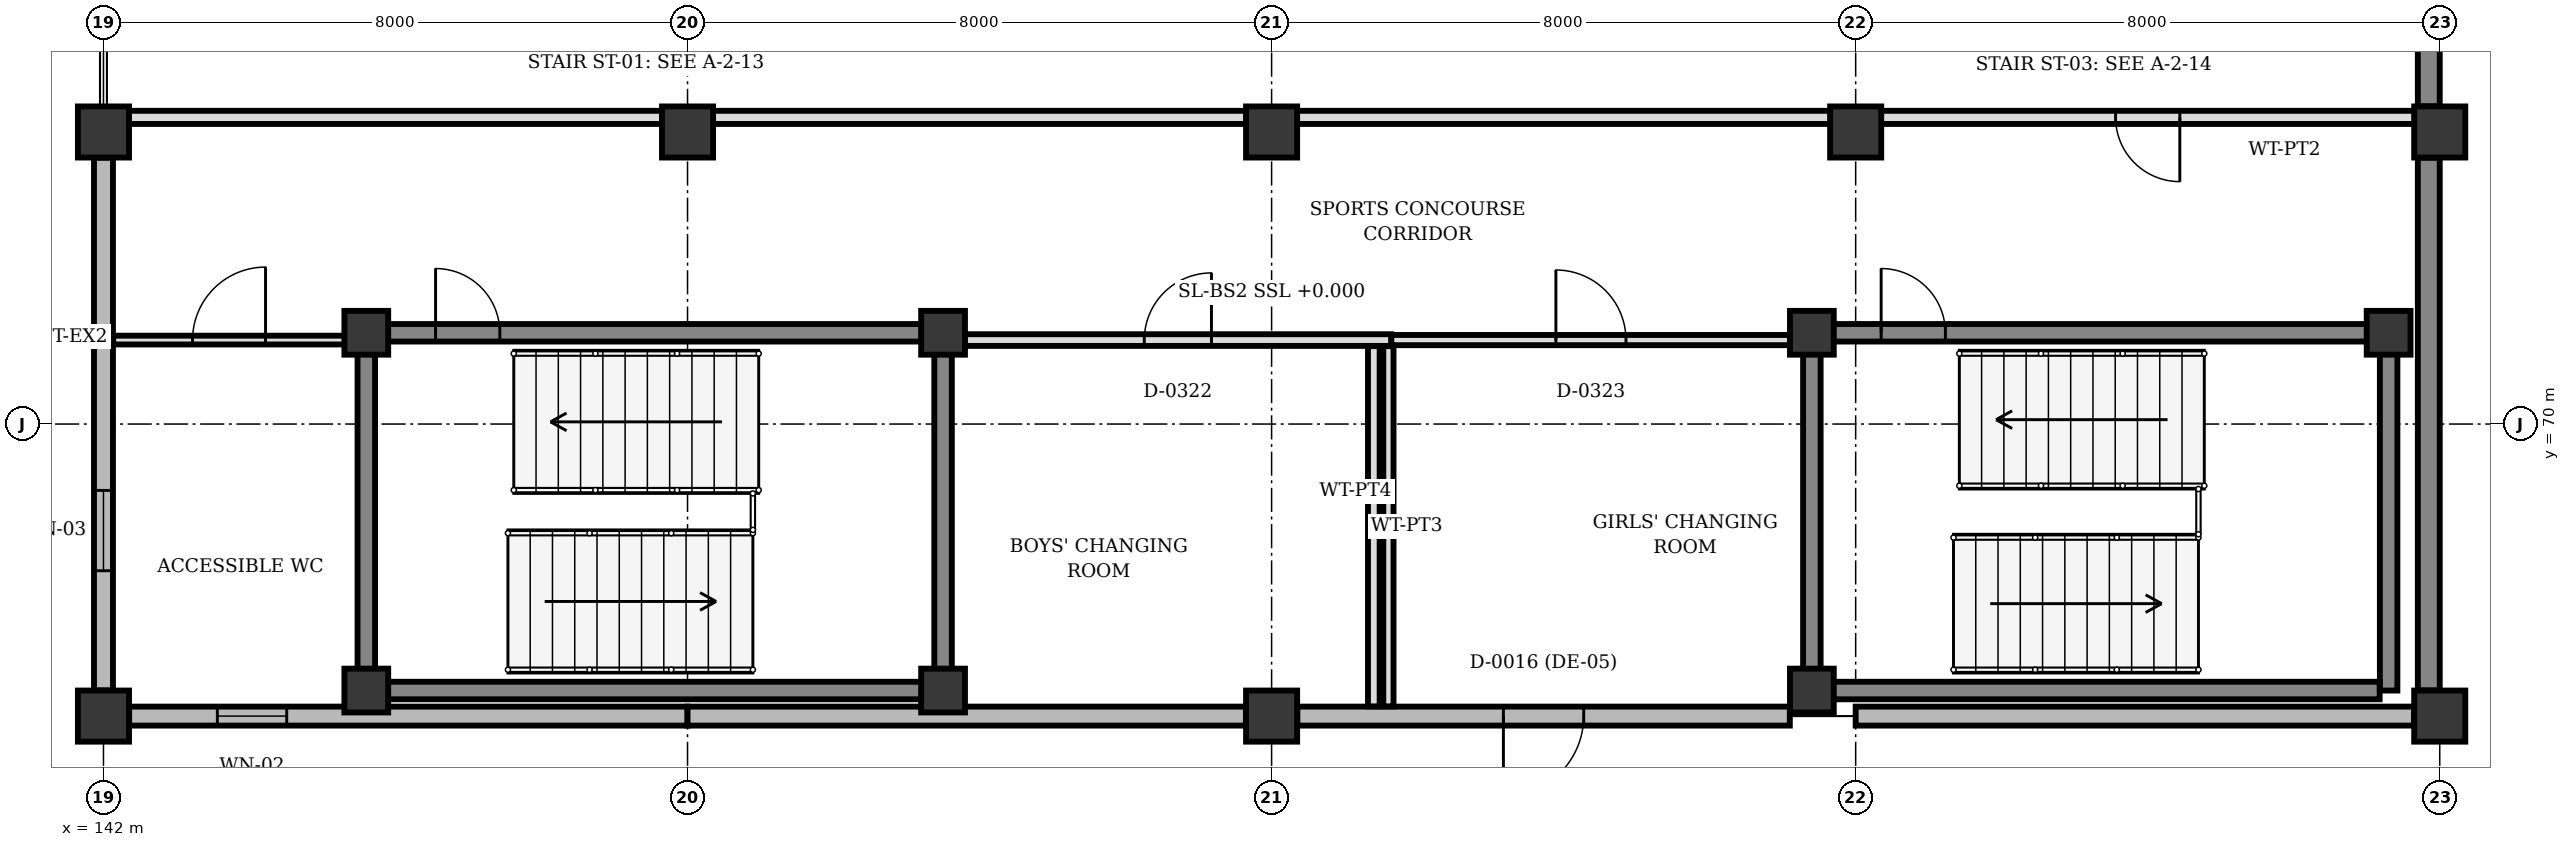
"""IFC4 building model, lengths in metres.
Left out: names, types, materials, properties, quantities, classifications, styles, units other than length and angle.
Written with IfcOpenShell. Run it as: python <this file> out.ifc"""

import sys

from ifc_helpers import new_model, si_unit, direction, frame, frame_2d, origin, origin_2d, place, context, subcontext, project, spatial, rectangle, extrude, element, fill, save


model = new_model("IFC4")
c1 = context("Model", 3, precision=1e-05, world=origin(), true_north=direction((0.0, 1.0)))
c2 = subcontext(c1, "Body", "Model", "MODEL_VIEW")
j1 = project(units=[si_unit("LENGTHUNIT", "METRE"), si_unit("PLANEANGLEUNIT", "RADIAN")], contexts=[c1])
p1 = place(None, origin())
s1 = spatial("IfcSite", under=j1, at=p1, CompositionType="ELEMENT")
p2 = place(p1, origin())
s2 = spatial("IfcBuilding", under=s1, at=p2, CompositionType="ELEMENT")
p3 = place(p2, origin())
s3 = spatial("IfcBuildingStorey", under=s2, at=p3, CompositionType="ELEMENT", Elevation=0.0)
for number, where, z_axis, x_axis in (
    (1, (145.6, 66.35, 0.0), (0.0, 0.0, 1.0), (1.0, 0.0, 0.0)),
    (2, (153.5, 66.35, 0.0), (0.0, 0.0, 1.0), (1.0, 0.0, 0.0)),
    (3, (153.5, 71.25, 0.0), (0.0, 0.0, 1.0), (1.0, 0.0, 0.0)),
    (4, (145.6, 71.25, 0.0), (0.0, 0.0, 1.0), (1.0, 0.0, 0.0)),
    (5, (165.4, 66.35, 0.0), (0.0, 0.0, 1.0), (1.0, 0.0, 0.0)),
    (6, (173.3, 71.25, 0.0), (0.0, 0.0, 1.0), (1.0, 0.0, 0.0)),
    (7, (165.4, 71.25, 0.0), (0.0, 0.0, 1.0), (1.0, 0.0, 0.0)),
):
    element("IfcColumn", number, at=place(p3, frame(where, z_axis=z_axis, x_axis=x_axis)), inside=s3, PredefinedType="COLUMN", context=c2, shape_type="SweptSolid", body=[
        extrude(rectangle(XDim=0.6, YDim=0.6, at=origin_2d()), origin(), (0.0, 0.0, 1.0), 4.5),
    ])
for number, where, z_axis, x_axis in (
    (8, (142.0, 66.0, 0.0), (0.0, 0.0, 1.0), (1.0, 0.0, 0.0)),
    (9, (142.0, 74.0, 0.0), (0.0, 0.0, 1.0), (1.0, 0.0, 0.0)),
    (10, (150.0, 74.0, 0.0), (0.0, 0.0, 1.0), (1.0, 0.0, 0.0)),
    (11, (158.0, 66.0, 0.0), (0.0, 0.0, 1.0), (1.0, 0.0, 0.0)),
    (12, (158.0, 74.0, 0.0), (0.0, 0.0, 1.0), (1.0, 0.0, 0.0)),
    (13, (166.0, 74.0, 0.0), (0.0, 0.0, 1.0), (1.0, 0.0, 0.0)),
    (14, (174.0, 66.0, 0.0), (0.0, 0.0, 1.0), (1.0, 0.0, 0.0)),
    (15, (174.0, 74.0, 0.0), (0.0, 0.0, 1.0), (1.0, 0.0, 0.0)),
):
    element("IfcColumn", number, at=place(p3, frame(where, z_axis=z_axis, x_axis=x_axis)), inside=s3, PredefinedType="COLUMN", context=c2, shape_type="SweptSolid", body=[
        extrude(rectangle(XDim=0.7, YDim=0.7, at=origin_2d()), origin(), (0.0, 0.0, 1.0), 4.5),
    ])
for number, where, z_axis, x_axis in (
    (16, (173.85, 81.648, 0.0), (0.0, 0.0, 1.0), (0.0, -1.0, 0.0)),
    (17, (173.85, 73.648, 0.0), (0.0, 0.0, 1.0), (0.0, -1.0, 0.0)),
):
    element("IfcWall", number, at=place(p3, frame(where, z_axis=z_axis, x_axis=x_axis)), inside=s3, PredefinedType="SHEAR", context=c2, shape_type="SweptSolid", body=[
        extrude(rectangle(XDim=7.296, YDim=0.3, at=frame_2d((3.648, 0.0))), origin(), (0.0, 0.0, 1.0), 3.402),
    ])
p4 = place(p3, frame((150.0, 66.0, 0.0), z_axis=(0.0, 0.0, 1.0), x_axis=(-1.0, 0.0, 0.0)))
e18 = element("IfcWall", 18, at=p4, inside=s3, PredefinedType="SOLIDWALL", context=c2, shape_type="SweptSolid", body=[
    extrude(rectangle(XDim=7.648, YDim=0.26, at=frame_2d((3.824, 0.0))), origin(), (0.0, 0.0, 1.0), 3.55),
])
p5 = place(p4, frame((5.49, 0.0, 1.1)))
e19 = element("IfcOpeningElement", 19, at=p5, cuts=e18, PredefinedType="OPENING", context=c2, shape_type="SweptSolid", body=[
    extrude(rectangle(XDim=0.95, YDim=1.1, at=frame_2d((0.475, 0.55))), frame((0.0, 0.14, 0.0), z_axis=(0.0, -1.0, 0.0), x_axis=(1.0, 0.0, 0.0)), (0.0, 0.0, 1.0), 0.28),
])
p6 = place(p3, frame((157.648, 66.0, 0.0), z_axis=(0.0, 0.0, 1.0), x_axis=(-1.0, 0.0, 0.0)))
e20 = element("IfcWall", 20, at=p6, inside=s3, PredefinedType="SOLIDWALL", context=c2, shape_type="SweptSolid", body=[
    extrude(rectangle(XDim=7.648, YDim=0.26, at=frame_2d((3.824, 0.0))), origin(), (0.0, 0.0, 1.0), 3.55),
])
p7 = place(p3, frame((165.098, 66.0, 0.0), z_axis=(0.0, 0.0, 1.0), x_axis=(-1.0, 0.0, 0.0)))
e21 = element("IfcWall", 21, at=p7, inside=s3, PredefinedType="SOLIDWALL", context=c2, shape_type="SweptSolid", body=[
    extrude(rectangle(XDim=6.746, YDim=0.26, at=frame_2d((3.373, 0.0))), origin(), (0.0, 0.0, 1.0), 3.55),
])
p8 = place(p7, frame((2.823, 0.0, 0.0)))
e22 = element("IfcOpeningElement", 22, at=p8, cuts=e21, PredefinedType="OPENING", context=c2, shape_type="SweptSolid", body=[
    extrude(rectangle(XDim=1.1, YDim=2.25, at=frame_2d((0.55, 1.125))), frame((0.0, 0.14, 0.0), z_axis=(0.0, -1.0, 0.0), x_axis=(1.0, 0.0, 0.0)), (0.0, 0.0, 1.0), 0.28),
])
p9 = place(p3, frame((173.648, 66.0, 0.0), z_axis=(0.0, 0.0, 1.0), x_axis=(-1.0, 0.0, 0.0)))
e23 = element("IfcWall", 23, at=p9, inside=s3, PredefinedType="SOLIDWALL", context=c2, shape_type="SweptSolid", body=[
    extrude(rectangle(XDim=7.648, YDim=0.26, at=frame_2d((3.824, 0.0))), origin(), (0.0, 0.0, 1.0), 3.55),
])
p10 = place(p3, frame((142.0, 66.352, 0.0), z_axis=(0.0, 0.0, 1.0), x_axis=(0.0, 1.0, 0.0)))
e24 = element("IfcWall", 24, at=p10, inside=s3, PredefinedType="SOLIDWALL", context=c2, shape_type="SweptSolid", body=[
    extrude(rectangle(XDim=7.296, YDim=0.26, at=frame_2d((3.648, 0.0))), origin(), (0.0, 0.0, 1.0), 3.55),
])
p11 = place(p10, frame((1.639, 0.0, 0.9)))
e25 = element("IfcOpeningElement", 25, at=p11, cuts=e24, PredefinedType="OPENING", context=c2, shape_type="SweptSolid", body=[
    extrude(rectangle(XDim=1.1, YDim=1.1, at=frame_2d((0.55, 0.55))), frame((0.0, 0.14, 0.0), z_axis=(0.0, -1.0, 0.0), x_axis=(1.0, 0.0, 0.0)), (0.0, 0.0, 1.0), 0.28),
])
for number, where, z_axis, x_axis in (
    (26, (145.6, 66.642, 0.0), (0.0, 0.0, 1.0), (0.0, 1.0, 0.0)),
    (27, (153.5, 70.958, 0.0), (0.0, 0.0, 1.0), (0.0, -1.0, 0.0)),
):
    element("IfcWall", number, at=place(p3, frame(where, z_axis=z_axis, x_axis=x_axis)), inside=s3, PredefinedType="SHEAR", context=c2, shape_type="SweptSolid", body=[
        extrude(rectangle(XDim=4.316, YDim=0.24, at=frame_2d((2.158, 0.0))), origin(), (0.0, 0.0, 1.0), 4.24),
    ])
p12 = place(p3, frame((153.208, 66.35, 0.0), z_axis=(0.0, 0.0, 1.0), x_axis=(-1.0, 0.0, 0.0)))
e28 = element("IfcWall", 28, at=p12, inside=s3, PredefinedType="SHEAR", context=c2, shape_type="SweptSolid", body=[
    extrude(rectangle(XDim=7.316, YDim=0.24, at=frame_2d((3.658, 0.0))), origin(), (0.0, 0.0, 1.0), 4.24),
])
p13 = place(p3, frame((145.892, 71.25, 0.0), z_axis=(0.0, 0.0, 1.0), x_axis=(1.0, 0.0, 0.0)))
e29 = element("IfcWall", 29, at=p13, inside=s3, PredefinedType="SHEAR", context=c2, shape_type="SweptSolid", body=[
    extrude(rectangle(XDim=7.316, YDim=0.24, at=frame_2d((3.658, 0.0))), origin(), (0.0, 0.0, 1.0), 4.24),
])
p14 = place(p13, frame((0.657, 0.0, 0.0)))
e30 = element("IfcOpeningElement", 30, at=p14, cuts=e29, PredefinedType="OPENING", context=c2, shape_type="SweptSolid", body=[
    extrude(rectangle(XDim=0.88, YDim=2.1, at=frame_2d((0.44, 1.05))), frame((0.0, 0.13, 0.0), z_axis=(0.0, -1.0, 0.0), x_axis=(1.0, 0.0, 0.0)), (0.0, 0.0, 1.0), 0.26),
])
p15 = place(p3, frame((165.4, 66.642, 0.0), z_axis=(0.0, 0.0, 1.0), x_axis=(0.0, 1.0, 0.0)))
e31 = element("IfcWall", 31, at=p15, inside=s3, PredefinedType="SHEAR", context=c2, shape_type="SweptSolid", body=[
    extrude(rectangle(XDim=4.316, YDim=0.24, at=frame_2d((2.158, 0.0))), origin(), (0.0, 0.0, 1.0), 4.24),
])
p16 = place(p3, frame((173.3, 70.958, 0.0), z_axis=(0.0, 0.0, 1.0), x_axis=(0.0, -1.0, 0.0)))
e32 = element("IfcWall", 32, at=p16, inside=s3, PredefinedType="SHEAR", context=c2, shape_type="SweptSolid", body=[
    extrude(rectangle(XDim=4.608, YDim=0.24, at=frame_2d((2.304, 0.0))), origin(), (0.0, 0.0, 1.0), 4.24),
])
p17 = place(p3, frame((173.177, 66.35, 0.0), z_axis=(0.0, 0.0, 1.0), x_axis=(-1.0, 0.0, 0.0)))
e33 = element("IfcWall", 33, at=p17, inside=s3, PredefinedType="SHEAR", context=c2, shape_type="SweptSolid", body=[
    extrude(rectangle(XDim=7.485, YDim=0.24, at=frame_2d((3.743, 0.0))), origin(), (0.0, 0.0, 1.0), 4.24),
])
p18 = place(p3, frame((165.692, 71.25, 0.0), z_axis=(0.0, 0.0, 1.0), x_axis=(1.0, 0.0, 0.0)))
e34 = element("IfcWall", 34, at=p18, inside=s3, PredefinedType="SHEAR", context=c2, shape_type="SweptSolid", body=[
    extrude(rectangle(XDim=7.316, YDim=0.24, at=frame_2d((3.658, 0.0))), origin(), (0.0, 0.0, 1.0), 4.24),
])
p19 = place(p18, frame((0.657, 0.0, 0.0)))
e35 = element("IfcOpeningElement", 35, at=p19, cuts=e34, PredefinedType="OPENING", context=c2, shape_type="SweptSolid", body=[
    extrude(rectangle(XDim=0.88, YDim=2.1, at=frame_2d((0.44, 1.05))), frame((0.0, 0.13, 0.0), z_axis=(0.0, -1.0, 0.0), x_axis=(1.0, 0.0, 0.0)), (0.0, 0.0, 1.0), 0.26),
])
p20 = place(p3, frame((173.658, 74.2, 0.0), z_axis=(0.0, 0.0, 1.0), x_axis=(-1.0, 0.0, 0.0)))
e36 = element("IfcWall", 36, at=p20, inside=s3, PredefinedType="PARTITIONING", context=c2, shape_type="SweptSolid", body=[
    extrude(rectangle(XDim=7.316, YDim=0.18, at=frame_2d((3.658, 0.0))), origin(), (0.0, 0.0, 1.0), 3.402),
])
p21 = place(p20, frame((3.218, 0.0, 0.0)))
e37 = element("IfcOpeningElement", 37, at=p21, cuts=e36, PredefinedType="OPENING", context=c2, shape_type="SweptSolid", body=[
    extrude(rectangle(XDim=0.88, YDim=2.1, at=frame_2d((0.44, 1.05))), frame((0.0, 0.1, 0.0), z_axis=(0.0, -1.0, 0.0), x_axis=(1.0, 0.0, 0.0)), (0.0, 0.0, 1.0), 0.2),
])
for number, where, z_axis, x_axis in (
    (38, (165.658, 74.2, 0.0), (0.0, 0.0, 1.0), (-1.0, 0.0, 0.0)),
    (39, (157.658, 74.2, 0.0), (0.0, 0.0, 1.0), (-1.0, 0.0, 0.0)),
    (40, (149.658, 74.2, 0.0), (0.0, 0.0, 1.0), (-1.0, 0.0, 0.0)),
):
    element("IfcWall", number, at=place(p3, frame(where, z_axis=z_axis, x_axis=x_axis)), inside=s3, PredefinedType="PARTITIONING", context=c2, shape_type="SweptSolid", body=[
        extrude(rectangle(XDim=7.316, YDim=0.18, at=frame_2d((3.658, 0.0))), origin(), (0.0, 0.0, 1.0), 3.402),
    ])
p22 = place(p3, frame((153.792, 71.15, 0.0), z_axis=(0.0, 0.0, 1.0), x_axis=(1.0, 0.0, 0.0)))
e41 = element("IfcWall", 41, at=p22, inside=s3, PredefinedType="PARTITIONING", context=c2, shape_type="SweptSolid", body=[
    extrude(rectangle(XDim=5.848, YDim=0.16, at=frame_2d((2.924, 0.0))), origin(), (0.0, 0.0, 1.0), 3.652),
])
p23 = place(p22, frame((2.464, 0.0, 0.0)))
e42 = element("IfcOpeningElement", 42, at=p23, cuts=e41, PredefinedType="OPENING", context=c2, shape_type="SweptSolid", body=[
    extrude(rectangle(XDim=0.92, YDim=2.1, at=frame_2d((0.46, 1.05))), frame((0.0, 0.09, 0.0), z_axis=(0.0, -1.0, 0.0), x_axis=(1.0, 0.0, 0.0)), (0.0, 0.0, 1.0), 0.18),
])
p24 = place(p3, frame((159.4, 71.067, 0.0), z_axis=(0.0, 0.0, 1.0), x_axis=(0.0, -1.0, 0.0)))
e43 = element("IfcWall", 43, at=p24, inside=s3, PredefinedType="PARTITIONING", context=c2, shape_type="SweptSolid", body=[
    extrude(rectangle(XDim=4.934, YDim=0.16, at=frame_2d((2.467, 0.0))), origin(), (0.0, 0.0, 1.0), 4.2),
])
p25 = place(p3, frame((159.64, 71.15, 0.0), z_axis=(0.0, 0.0, 1.0), x_axis=(1.0, 0.0, 0.0)))
e44 = element("IfcWall", 44, at=p25, inside=s3, PredefinedType="PARTITIONING", context=c2, shape_type="SweptSolid", body=[
    extrude(rectangle(XDim=5.468, YDim=0.14, at=frame_2d((2.734, 0.0))), origin(), (0.0, 0.0, 1.0), 4.2),
])
p26 = place(p25, frame((2.254, 0.0, 0.0)))
e45 = element("IfcOpeningElement", 45, at=p26, cuts=e44, PredefinedType="OPENING", context=c2, shape_type="SweptSolid", body=[
    extrude(rectangle(XDim=0.96, YDim=2.1, at=frame_2d((0.48, 1.05))), frame((0.0, 0.08, 0.0), z_axis=(0.0, -1.0, 0.0), x_axis=(1.0, 0.0, 0.0)), (0.0, 0.0, 1.0), 0.16),
])
p27 = place(p3, frame((159.6, 66.133, 0.0), z_axis=(0.0, 0.0, 1.0), x_axis=(0.0, 1.0, 0.0)))
e46 = element("IfcWall", 46, at=p27, inside=s3, PredefinedType="PARTITIONING", context=c2, shape_type="SweptSolid", body=[
    extrude(rectangle(XDim=4.934, YDim=0.14, at=frame_2d((2.467, 0.0))), origin(), (0.0, 0.0, 1.0), 4.2),
])
p28 = place(p3, frame((142.133, 71.15, 0.0), z_axis=(0.0, 0.0, 1.0), x_axis=(1.0, 0.0, 0.0)))
e47 = element("IfcWall", 47, at=p28, inside=s3, PredefinedType="PARTITIONING", context=c2, shape_type="SweptSolid", body=[
    extrude(rectangle(XDim=3.175, YDim=0.12, at=frame_2d((1.587, 0.0))), origin(), (0.0, 0.0, 1.0), 3.652),
])
p29 = place(p28, frame((1.087, 0.0, 0.0)))
e48 = element("IfcOpeningElement", 48, at=p29, cuts=e47, PredefinedType="OPENING", context=c2, shape_type="SweptSolid", body=[
    extrude(rectangle(XDim=1.0, YDim=2.1, at=frame_2d((0.5, 1.05))), frame((0.0, 0.07, 0.0), z_axis=(0.0, -1.0, 0.0), x_axis=(1.0, 0.0, 0.0)), (0.0, 0.0, 1.0), 0.14),
])
p30 = place(p5, origin())
e49 = element("IfcWindow", 49, at=p30, inside=s3, PartitioningType="SINGLE_PANEL", PredefinedType="WINDOW", context=c2, shape_type="SweptSolid", body=[
    extrude(rectangle(XDim=0.95, YDim=1.1, at=frame_2d((0.475, 0.55))), frame((0.0, 0.03, 0.0), z_axis=(0.0, -1.0, 0.0), x_axis=(1.0, 0.0, 0.0)), (0.0, 0.0, 1.0), 0.06),
])
fill(e19, e49)
p31 = place(p8, origin())
e50 = element("IfcDoor", 50, at=p31, inside=s3, OperationType="SINGLE_SWING_RIGHT", PredefinedType="DOOR", context=c2, shape_type="SweptSolid", body=[
    extrude(rectangle(XDim=1.1, YDim=2.25, at=frame_2d((0.55, 1.125))), frame((0.0, 0.025, 0.0), z_axis=(0.0, -1.0, 0.0), x_axis=(1.0, 0.0, 0.0)), (0.0, 0.0, 1.0), 0.05),
])
fill(e22, e50)
p32 = place(p11, origin())
e51 = element("IfcWindow", 51, at=p32, inside=s3, PartitioningType="SINGLE_PANEL", PredefinedType="WINDOW", context=c2, shape_type="SweptSolid", body=[
    extrude(rectangle(XDim=1.1, YDim=1.1, at=frame_2d((0.55, 0.55))), frame((0.0, 0.03, 0.0), z_axis=(0.0, -1.0, 0.0), x_axis=(1.0, 0.0, 0.0)), (0.0, 0.0, 1.0), 0.06),
])
fill(e25, e51)
p33 = place(p14, origin())
e52 = element("IfcDoor", 52, at=p33, inside=s3, OperationType="SINGLE_SWING_LEFT", PredefinedType="DOOR", context=c2, shape_type="SweptSolid", body=[
    extrude(rectangle(XDim=0.88, YDim=2.1, at=frame_2d((0.44, 1.05))), frame((0.0, 0.025, 0.0), z_axis=(0.0, -1.0, 0.0), x_axis=(1.0, 0.0, 0.0)), (0.0, 0.0, 1.0), 0.05),
])
fill(e30, e52)
p34 = place(p19, origin())
e53 = element("IfcDoor", 53, at=p34, inside=s3, OperationType="SINGLE_SWING_LEFT", PredefinedType="DOOR", context=c2, shape_type="SweptSolid", body=[
    extrude(rectangle(XDim=0.88, YDim=2.1, at=frame_2d((0.44, 1.05))), frame((0.0, 0.025, 0.0), z_axis=(0.0, -1.0, 0.0), x_axis=(1.0, 0.0, 0.0)), (0.0, 0.0, 1.0), 0.05),
])
fill(e35, e53)
p35 = place(p21, origin())
e54 = element("IfcDoor", 54, at=p35, inside=s3, OperationType="SINGLE_SWING_LEFT", PredefinedType="DOOR", context=c2, shape_type="SweptSolid", body=[
    extrude(rectangle(XDim=0.88, YDim=2.1, at=frame_2d((0.44, 1.05))), frame((0.0, 0.025, 0.0), z_axis=(0.0, -1.0, 0.0), x_axis=(1.0, 0.0, 0.0)), (0.0, 0.0, 1.0), 0.05),
])
fill(e37, e54)
p36 = place(p23, origin())
e55 = element("IfcDoor", 55, at=p36, inside=s3, OperationType="SINGLE_SWING_RIGHT", PredefinedType="DOOR", context=c2, shape_type="SweptSolid", body=[
    extrude(rectangle(XDim=0.92, YDim=2.1, at=frame_2d((0.46, 1.05))), frame((0.0, 0.025, 0.0), z_axis=(0.0, -1.0, 0.0), x_axis=(1.0, 0.0, 0.0)), (0.0, 0.0, 1.0), 0.05),
])
fill(e42, e55)
p37 = place(p26, origin())
e56 = element("IfcDoor", 56, at=p37, inside=s3, OperationType="SINGLE_SWING_LEFT", PredefinedType="DOOR", context=c2, shape_type="SweptSolid", body=[
    extrude(rectangle(XDim=0.96, YDim=2.1, at=frame_2d((0.48, 1.05))), frame((0.0, 0.025, 0.0), z_axis=(0.0, -1.0, 0.0), x_axis=(1.0, 0.0, 0.0)), (0.0, 0.0, 1.0), 0.05),
])
fill(e45, e56)
p38 = place(p29, origin())
e57 = element("IfcDoor", 57, at=p38, inside=s3, OperationType="SINGLE_SWING_RIGHT", PredefinedType="DOOR", context=c2, shape_type="SweptSolid", body=[
    extrude(rectangle(XDim=1.0, YDim=2.1, at=frame_2d((0.5, 1.05))), frame((0.0, 0.025, 0.0), z_axis=(0.0, -1.0, 0.0), x_axis=(1.0, 0.0, 0.0)), (0.0, 0.0, 1.0), 0.05),
])
fill(e48, e57)
save(model, sys.argv[1])
